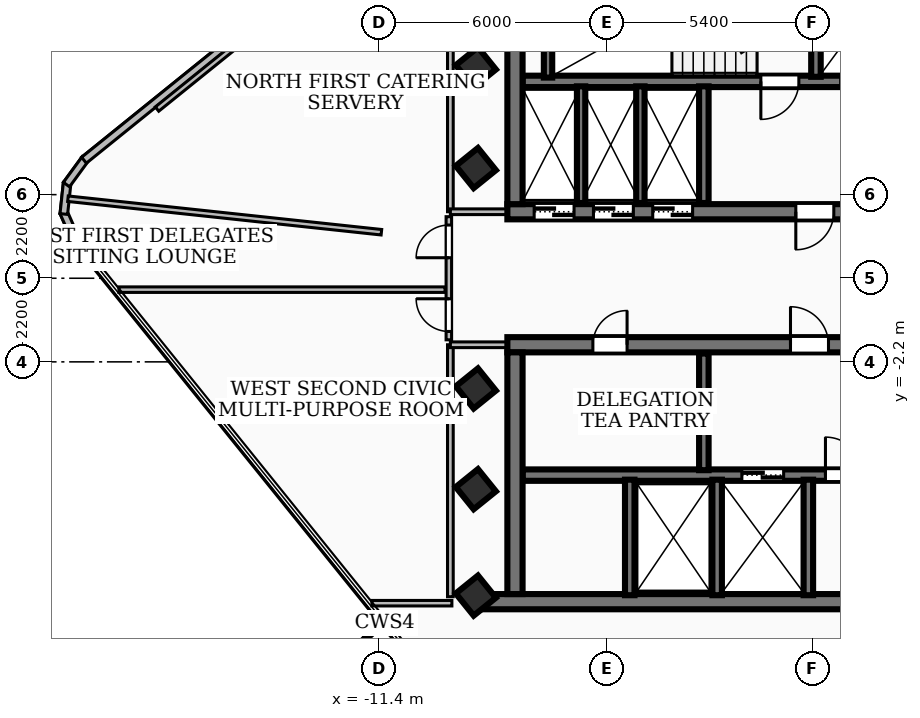
"""IFC4 building model, lengths in metres.
Left out: names, types, materials, properties, quantities, classifications, styles, units other than length and angle.
Written with IfcOpenShell. Run it as: python <this file> out.ifc"""

import sys

from ifc_helpers import new_model, si_unit, direction, frame, frame_2d, origin, origin_2d, place, context, subcontext, project, spatial, rectangle, extrude, element, fill, save


model = new_model("IFC4")
c1 = context("Model", 3, precision=1e-05, world=origin(), true_north=direction((0.0, 1.0)))
c2 = subcontext(c1, "Body", "Model", "MODEL_VIEW")
j1 = project(units=[si_unit("LENGTHUNIT", "METRE"), si_unit("PLANEANGLEUNIT", "RADIAN")], contexts=[c1])
p1 = place(None, origin())
s1 = spatial("IfcSite", under=j1, at=p1, CompositionType="ELEMENT")
p2 = place(p1, origin())
s2 = spatial("IfcBuilding", under=s1, at=p2, CompositionType="ELEMENT")
p3 = place(p2, frame((0.0, 0.0, 235.98)))
s3 = spatial("IfcBuildingStorey", under=s2, at=p3, CompositionType="ELEMENT", Elevation=235.98)
p4 = place(p3, frame((8.02, 1.75, 0.0), z_axis=(0.0, 0.0, 1.0), x_axis=(-1.0, 0.0, 0.0)))
e1 = element("IfcWall", 1, at=p4, inside=s3, PredefinedType="SHEAR", context=c2, shape_type="SweptSolid", body=[
    extrude(rectangle(XDim=16.04, YDim=0.4, at=frame_2d((8.02, 0.0))), origin(), (0.0, 0.0, 1.0), 3.02),
])
p5 = place(p4, frame((7.45, 0.0, 0.0)))
e2 = element("IfcOpeningElement", 2, at=p5, cuts=e1, PredefinedType="OPENING", context=c2, shape_type="SweptSolid", body=[
    extrude(rectangle(XDim=1.0, YDim=2.1, at=frame_2d((0.5, 1.05))), frame((0.0, 0.21, 0.0), z_axis=(0.0, -1.0, 0.0), x_axis=(1.0, 0.0, 0.0)), (0.0, 0.0, 1.0), 0.42),
])
p6 = place(p4, frame((14.285, 0.0, 0.0)))
e3 = element("IfcOpeningElement", 3, at=p6, cuts=e1, PredefinedType="OPENING", context=c2, shape_type="SweptSolid", body=[
    extrude(rectangle(XDim=1.05, YDim=2.15, at=frame_2d((0.525, 1.075))), frame((0.0, 0.21, 0.0), z_axis=(0.0, -1.0, 0.0), x_axis=(1.0, 0.0, 0.0)), (0.0, 0.0, 1.0), 0.42),
])
p7 = place(p4, frame((12.725, 0.0, 0.0)))
e4 = element("IfcOpeningElement", 4, at=p7, cuts=e1, PredefinedType="OPENING", context=c2, shape_type="SweptSolid", body=[
    extrude(rectangle(XDim=1.05, YDim=2.15, at=frame_2d((0.525, 1.075))), frame((0.0, 0.21, 0.0), z_axis=(0.0, -1.0, 0.0), x_axis=(1.0, 0.0, 0.0)), (0.0, 0.0, 1.0), 0.42),
])
p8 = place(p4, frame((11.165, 0.0, 0.0)))
e5 = element("IfcOpeningElement", 5, at=p8, cuts=e1, PredefinedType="OPENING", context=c2, shape_type="SweptSolid", body=[
    extrude(rectangle(XDim=1.05, YDim=2.15, at=frame_2d((0.525, 1.075))), frame((0.0, 0.21, 0.0), z_axis=(0.0, -1.0, 0.0), x_axis=(1.0, 0.0, 0.0)), (0.0, 0.0, 1.0), 0.42),
])
p9 = place(p4, frame((3.4, 0.0, 0.0)))
e6 = element("IfcOpeningElement", 6, at=p9, cuts=e1, PredefinedType="OPENING", context=c2, shape_type="SweptSolid", body=[
    extrude(rectangle(XDim=0.9, YDim=2.06, at=frame_2d((0.45, 1.03))), frame((0.0, 0.21, 0.0), z_axis=(0.0, -1.0, 0.0), x_axis=(1.0, 0.0, 0.0)), (0.0, 0.0, 1.0), 0.42),
])
p10 = place(p4, frame((1.1, 0.0, 0.0)))
e7 = element("IfcOpeningElement", 7, at=p10, cuts=e1, PredefinedType="OPENING", context=c2, shape_type="SweptSolid", body=[
    extrude(rectangle(XDim=0.9, YDim=2.06, at=frame_2d((0.45, 1.03))), frame((0.0, 0.21, 0.0), z_axis=(0.0, -1.0, 0.0), x_axis=(1.0, 0.0, 0.0)), (0.0, 0.0, 1.0), 0.42),
])
p11 = place(p3, frame((-7.82, 1.95, 0.0), z_axis=(0.0, 0.0, 1.0), x_axis=(0.0, 1.0, 0.0)))
e8 = element("IfcWall", 8, at=p11, inside=s3, PredefinedType="SHEAR", context=c2, shape_type="SweptSolid", body=[
    extrude(rectangle(XDim=6.36, YDim=0.4, at=frame_2d((3.18, 0.0))), origin(), (0.0, 0.0, 1.0), 3.02),
])
p12 = place(p3, frame((7.62, 5.18, 0.0), z_axis=(0.0, 0.0, 1.0), x_axis=(-1.0, 0.0, 0.0)))
e9 = element("IfcWall", 9, at=p12, inside=s3, PredefinedType="SOLIDWALL", context=c2, shape_type="SweptSolid", body=[
    extrude(rectangle(XDim=15.24, YDim=0.3, at=frame_2d((7.62, 0.0))), origin(), (0.0, 0.0, 1.0), 3.02),
])
p13 = place(p12, frame((5.77, 0.0, 0.0)))
e10 = element("IfcOpeningElement", 10, at=p13, cuts=e9, PredefinedType="OPENING", context=c2, shape_type="SweptSolid", body=[
    extrude(rectangle(XDim=1.1, YDim=2.15, at=frame_2d((0.55, 1.075))), frame((0.0, 0.16, 0.0), z_axis=(0.0, -1.0, 0.0), x_axis=(1.0, 0.0, 0.0)), (0.0, 0.0, 1.0), 0.32),
])
p14 = place(p12, frame((2.97, 0.0, 0.0)))
e11 = element("IfcOpeningElement", 11, at=p14, cuts=e9, PredefinedType="OPENING", context=c2, shape_type="SweptSolid", body=[
    extrude(rectangle(XDim=1.1, YDim=2.15, at=frame_2d((0.55, 1.075))), frame((0.0, 0.16, 0.0), z_axis=(0.0, -1.0, 0.0), x_axis=(1.0, 0.0, 0.0)), (0.0, 0.0, 1.0), 0.32),
])
p15 = place(p12, frame((7.97, 0.0, 0.0)))
e12 = element("IfcOpeningElement", 12, at=p15, cuts=e9, PredefinedType="OPENING", context=c2, shape_type="SweptSolid", body=[
    extrude(rectangle(XDim=1.0, YDim=2.1, at=frame_2d((0.5, 1.05))), frame((0.0, 0.16, 0.0), z_axis=(0.0, -1.0, 0.0), x_axis=(1.0, 0.0, 0.0)), (0.0, 0.0, 1.0), 0.32),
])
p16 = place(p3, frame((8.78, -8.51, 0.0), z_axis=(0.0, 0.0, 1.0), x_axis=(-1.0, 0.0, 0.0)))
e13 = element("IfcWall", 13, at=p16, inside=s3, PredefinedType="SHEAR", context=c2, shape_type="SweptSolid", body=[
    extrude(rectangle(XDim=17.56, YDim=0.4, at=frame_2d((8.78, 0.0))), origin(), (0.0, 0.0, 1.0), 3.02),
])
p17 = place(p3, frame((-8.02, -1.75, 0.0), z_axis=(0.0, 0.0, 1.0), x_axis=(1.0, 0.0, 0.0)))
e14 = element("IfcWall", 14, at=p17, inside=s3, PredefinedType="SHEAR", context=c2, shape_type="SweptSolid", body=[
    extrude(rectangle(XDim=16.04, YDim=0.4, at=frame_2d((8.02, 0.0))), origin(), (0.0, 0.0, 1.0), 3.02),
])
p18 = place(p17, frame((7.45, 0.0, 0.0)))
e15 = element("IfcOpeningElement", 15, at=p18, cuts=e14, PredefinedType="OPENING", context=c2, shape_type="SweptSolid", body=[
    extrude(rectangle(XDim=1.0, YDim=2.1, at=frame_2d((0.5, 1.05))), frame((0.0, 0.21, 0.0), z_axis=(0.0, -1.0, 0.0), x_axis=(1.0, 0.0, 0.0)), (0.0, 0.0, 1.0), 0.42),
])
p19 = place(p17, frame((12.65, 0.0, 0.0)))
e16 = element("IfcOpeningElement", 16, at=p19, cuts=e14, PredefinedType="OPENING", context=c2, shape_type="SweptSolid", body=[
    extrude(rectangle(XDim=0.9, YDim=2.06, at=frame_2d((0.45, 1.03))), frame((0.0, 0.21, 0.0), z_axis=(0.0, -1.0, 0.0), x_axis=(1.0, 0.0, 0.0)), (0.0, 0.0, 1.0), 0.42),
])
p20 = place(p17, frame((2.25, 0.0, 0.0)))
e17 = element("IfcOpeningElement", 17, at=p20, cuts=e14, PredefinedType="OPENING", context=c2, shape_type="SweptSolid", body=[
    extrude(rectangle(XDim=0.9, YDim=2.06, at=frame_2d((0.45, 1.03))), frame((0.0, 0.21, 0.0), z_axis=(0.0, -1.0, 0.0), x_axis=(1.0, 0.0, 0.0)), (0.0, 0.0, 1.0), 0.42),
])
p21 = place(p3, frame((-7.82, -8.31, 0.0), z_axis=(0.0, 0.0, 1.0), x_axis=(0.0, 1.0, 0.0)))
e18 = element("IfcWall", 18, at=p21, inside=s3, PredefinedType="SHEAR", context=c2, shape_type="SweptSolid", body=[
    extrude(rectangle(XDim=6.36, YDim=0.4, at=frame_2d((3.18, 0.0))), origin(), (0.0, 0.0, 1.0), 3.02),
])
p22 = place(p3, frame((-7.62, -5.18, 0.0), z_axis=(0.0, 0.0, 1.0), x_axis=(1.0, 0.0, 0.0)))
e19 = element("IfcWall", 19, at=p22, inside=s3, PredefinedType="SOLIDWALL", context=c2, shape_type="SweptSolid", body=[
    extrude(rectangle(XDim=15.24, YDim=0.3, at=frame_2d((7.62, 0.0))), origin(), (0.0, 0.0, 1.0), 3.02),
])
p23 = place(p22, frame((5.77, 0.0, 0.0)))
e20 = element("IfcOpeningElement", 20, at=p23, cuts=e19, PredefinedType="OPENING", context=c2, shape_type="SweptSolid", body=[
    extrude(rectangle(XDim=1.1, YDim=2.15, at=frame_2d((0.55, 1.075))), frame((0.0, 0.16, 0.0), z_axis=(0.0, -1.0, 0.0), x_axis=(1.0, 0.0, 0.0)), (0.0, 0.0, 1.0), 0.32),
])
p24 = place(p22, frame((7.97, 0.0, 0.0)))
e21 = element("IfcOpeningElement", 21, at=p24, cuts=e19, PredefinedType="OPENING", context=c2, shape_type="SweptSolid", body=[
    extrude(rectangle(XDim=1.0, YDim=2.1, at=frame_2d((0.5, 1.05))), frame((0.0, 0.16, 0.0), z_axis=(0.0, -1.0, 0.0), x_axis=(1.0, 0.0, 0.0)), (0.0, 0.0, 1.0), 0.32),
])
p25 = place(p3, frame((-6.95, 5.28, 0.0), z_axis=(0.0, 0.0, 1.0), x_axis=(0.0, 1.0, 0.0)))
e22 = element("IfcWall", 22, at=p25, inside=s3, PredefinedType="SOLIDWALL", context=c2, shape_type="SweptSolid", body=[
    extrude(rectangle(XDim=3.06, YDim=0.22, at=frame_2d((1.53, 0.0))), origin(), (0.0, 0.0, 1.0), 3.02),
])
p26 = place(p3, frame((0.1, 5.3, 0.0), z_axis=(0.0, 0.0, 1.0), x_axis=(0.0, 1.0, 0.0)))
e23 = element("IfcWall", 23, at=p26, inside=s3, PredefinedType="SOLIDWALL", context=c2, shape_type="SweptSolid", body=[
    extrude(rectangle(XDim=3.04, YDim=0.25, at=frame_2d((1.52, 0.0))), origin(), (0.0, 0.0, 1.0), 3.02),
])
p27 = place(p3, frame((-2.85, 1.98, 0.0), z_axis=(0.0, 0.0, 1.0), x_axis=(0.0, 1.0, 0.0)))
e24 = element("IfcWall", 24, at=p27, inside=s3, PredefinedType="SOLIDWALL", context=c2, shape_type="SweptSolid", body=[
    extrude(rectangle(XDim=3.07, YDim=0.25, at=frame_2d((1.535, 0.0))), origin(), (0.0, 0.0, 1.0), 3.02),
])
for number, where, z_axis, x_axis in (
    (25, (-0.1, -8.34, 0.0), (0.0, 0.0, 1.0), (0.0, 1.0, 0.0)),
    (26, (-2.5, -8.34, 0.0), (0.0, 0.0, 1.0), (0.0, 1.0, 0.0)),
    (27, (-4.8, -8.34, 0.0), (0.0, 0.0, 1.0), (0.0, 1.0, 0.0)),
):
    element("IfcWall", number, at=place(p3, frame(where, z_axis=z_axis, x_axis=x_axis)), inside=s3, PredefinedType="SOLIDWALL", context=c2, shape_type="SweptSolid", body=[
        extrude(rectangle(XDim=3.04, YDim=0.25, at=frame_2d((1.52, 0.0))), origin(), (0.0, 0.0, 1.0), 3.02),
    ])
p28 = place(p3, frame((-2.85, -5.05, 0.0), z_axis=(0.0, 0.0, 1.0), x_axis=(0.0, 1.0, 0.0)))
e28 = element("IfcWall", 28, at=p28, inside=s3, PredefinedType="SOLIDWALL", context=c2, shape_type="SweptSolid", body=[
    extrude(rectangle(XDim=3.07, YDim=0.25, at=frame_2d((1.535, 0.0))), origin(), (0.0, 0.0, 1.0), 3.02),
])
for number, where, z_axis, x_axis in (
    (29, (-6.08, 1.98, 0.0), (0.0, 0.0, 1.0), (0.0, 1.0, 0.0)),
    (30, (-4.52, 1.98, 0.0), (0.0, 0.0, 1.0), (0.0, 1.0, 0.0)),
):
    element("IfcWall", number, at=place(p3, frame(where, z_axis=z_axis, x_axis=x_axis)), inside=s3, PredefinedType="SOLIDWALL", context=c2, shape_type="SweptSolid", body=[
        extrude(rectangle(XDim=3.07, YDim=0.22, at=frame_2d((1.535, 0.0))), origin(), (0.0, 0.0, 1.0), 3.02),
    ])
for number, where, z_axis, x_axis in (
    (31, (-8.85, -5.55, 0.0), (0.0, 0.0, 1.0), (0.778, 0.628, 0.0)),
    (32, (-8.85, -2.9, 0.0), (0.0, 0.0, 1.0), (0.778, 0.628, 0.0)),
    (33, (-8.85, 2.9, 0.0), (0.0, 0.0, 1.0), (0.778, 0.628, 0.0)),
    (34, (-8.85, 5.55, 0.0), (0.0, 0.0, 1.0), (0.778, 0.628, 0.0)),
    (35, (-8.85, -8.35, 0.0), (0.0, 0.0, 1.0), (0.778, 0.628, 0.0)),
):
    element("IfcColumn", number, at=place(p3, frame(where, z_axis=z_axis, x_axis=x_axis)), inside=s3, PredefinedType="COLUMN", context=c2, shape_type="SweptSolid", body=[
        extrude(rectangle(XDim=0.75, YDim=0.75, at=origin_2d()), origin(), (0.0, 0.0, 1.0), 3.42),
    ])
p29 = place(p3, frame((-19.359, 0.971, 0.0), z_axis=(0.0, 0.0, 1.0), x_axis=(-0.405301422885, 0.914183108905, 0.0)))
e36 = element("IfcWall", 36, at=p29, inside=s3, PredefinedType="SOLIDWALL", context=c2, shape_type="SweptSolid", body=[
    extrude(rectangle(XDim=0.839, YDim=0.2, at=frame_2d((0.419, 0.0))), origin(), (0.0, 0.0, 1.0), 3.02),
])
p30 = place(p3, frame((-19.692, 1.69, 0.0), z_axis=(0.0, 0.0, 1.0), x_axis=(0.10656447925, 0.994305793889, 0.0)))
e37 = element("IfcWall", 37, at=p30, inside=s3, PredefinedType="SOLIDWALL", context=c2, shape_type="SweptSolid", body=[
    extrude(rectangle(XDim=0.825, YDim=0.2, at=frame_2d((0.412, 0.0))), origin(), (0.0, 0.0, 1.0), 3.02),
])
p31 = place(p3, frame((-19.622, 2.465, 0.0), z_axis=(0.0, 0.0, 1.0), x_axis=(0.590315771763, 0.807172403894, 0.0)))
e38 = element("IfcWall", 38, at=p31, inside=s3, PredefinedType="SOLIDWALL", context=c2, shape_type="SweptSolid", body=[
    extrude(rectangle(XDim=0.839, YDim=0.2, at=frame_2d((0.419, 0.0))), origin(), (0.0, 0.0, 1.0), 3.02),
])
p32 = place(p3, frame((-19.161, 3.106, 0.0), z_axis=(0.0, 0.0, 1.0), x_axis=(0.778151520732, 0.62807659627, 0.0)))
e39 = element("IfcWall", 39, at=p32, inside=s3, PredefinedType="SOLIDWALL", context=c2, shape_type="SweptSolid", body=[
    extrude(rectangle(XDim=6.741, YDim=0.2, at=frame_2d((3.371, 0.0))), origin(), (0.0, 0.0, 1.0), 3.02),
])
p33 = place(p3, frame((-9.52, 1.75, 0.0), z_axis=(0.0, 0.0, 1.0), x_axis=(0.0, 1.0, 0.0)))
e40 = element("IfcWall", 40, at=p33, inside=s3, PredefinedType="PARTITIONING", context=c2, shape_type="SweptSolid", body=[
    extrude(rectangle(XDim=6.63, YDim=0.15, at=frame_2d((3.315, 0.0))), origin(), (0.0, 0.0, 1.0), 1.904),
])
p34 = place(p3, frame((-7.85, 1.75, 0.0), z_axis=(0.0, 0.0, 1.0), x_axis=(-1.0, 0.0, 0.0)))
e41 = element("IfcWall", 41, at=p34, inside=s3, PredefinedType="PARTITIONING", context=c2, shape_type="SweptSolid", body=[
    extrude(rectangle(XDim=1.67, YDim=0.15, at=frame_2d((0.835, 0.0))), origin(), (0.0, 0.0, 1.0), 1.15),
])
p35 = place(p3, frame((-9.52, -8.38, 0.0), z_axis=(0.0, 0.0, 1.0), x_axis=(0.0, 1.0, 0.0)))
e42 = element("IfcWall", 42, at=p35, inside=s3, PredefinedType="PARTITIONING", context=c2, shape_type="SweptSolid", body=[
    extrude(rectangle(XDim=6.63, YDim=0.15, at=frame_2d((3.315, 0.0))), origin(), (0.0, 0.0, 1.0), 1.904),
])
p36 = place(p3, frame((-7.85, -1.75, 0.0), z_axis=(0.0, 0.0, 1.0), x_axis=(-1.0, 0.0, 0.0)))
e43 = element("IfcWall", 43, at=p36, inside=s3, PredefinedType="PARTITIONING", context=c2, shape_type="SweptSolid", body=[
    extrude(rectangle(XDim=1.67, YDim=0.15, at=frame_2d((0.835, 0.0))), origin(), (0.0, 0.0, 1.0), 1.15),
])
p37 = place(p3, frame((-18.242, -0.3, 0.0), z_axis=(0.0, 0.0, 1.0), x_axis=(1.0, 0.0, 0.0)))
e44 = element("IfcWall", 44, at=p37, inside=s3, PredefinedType="PARTITIONING", context=c2, shape_type="SweptSolid", body=[
    extrude(rectangle(XDim=8.582, YDim=0.145, at=frame_2d((4.291, 0.0))), origin(), (0.0, 0.0, 1.0), 1.15),
])
p38 = place(p3, frame((-11.585, -8.55, 0.0), z_axis=(0.0, 0.0, 1.0), x_axis=(1.0, 0.0, 0.0)))
e45 = element("IfcWall", 45, at=p38, inside=s3, PredefinedType="PARTITIONING", context=c2, shape_type="SweptSolid", body=[
    extrude(rectangle(XDim=2.105, YDim=0.145, at=frame_2d((1.052, 0.0))), origin(), (0.0, 0.0, 1.0), 3.02),
])
p39 = place(p3, frame((-9.56, -1.62, 0.0), z_axis=(0.0, 0.0, 1.0), x_axis=(0.0, 1.0, 0.0)))
e46 = element("IfcWall", 46, at=p39, inside=s3, PredefinedType="PARTITIONING", context=c2, shape_type="SweptSolid", body=[
    extrude(rectangle(XDim=3.24, YDim=0.145, at=frame_2d((1.62, 0.0))), origin(), (0.0, 0.0, 1.0), 3.02),
])
p40 = place(p39, frame((0.22, 0.0, 0.0)))
e47 = element("IfcOpeningElement", 47, at=p40, cuts=e46, PredefinedType="OPENING", context=c2, shape_type="SweptSolid", body=[
    extrude(rectangle(XDim=0.86, YDim=2.04, at=frame_2d((0.43, 1.02))), frame((0.0, 0.083, 0.0), z_axis=(0.0, -1.0, 0.0), x_axis=(1.0, 0.0, 0.0)), (0.0, 0.0, 1.0), 0.165),
])
p41 = place(p39, frame((2.16, 0.0, 0.0)))
e48 = element("IfcOpeningElement", 48, at=p41, cuts=e46, PredefinedType="OPENING", context=c2, shape_type="SweptSolid", body=[
    extrude(rectangle(XDim=0.86, YDim=2.04, at=frame_2d((0.43, 1.02))), frame((0.0, 0.083, 0.0), z_axis=(0.0, -1.0, 0.0), x_axis=(1.0, 0.0, 0.0)), (0.0, 0.0, 1.0), 0.165),
])
p42 = place(p3, frame((-11.335, 1.211, 0.0), z_axis=(0.0, 0.0, 1.0), x_axis=(-0.994330067434, 0.106337749634, 0.0)))
e49 = element("IfcWall", 49, at=p42, inside=s3, PredefinedType="PARTITIONING", context=c2, shape_type="SweptSolid", body=[
    extrude(rectangle(XDim=8.295, YDim=0.145, at=frame_2d((4.147, 0.0))), origin(), (0.0, 0.0, 1.0), 1.15),
])
p43 = place(p3, frame((-17.239, 4.452, 0.0), z_axis=(0.0, 0.0, 1.0), x_axis=(0.778262183237, 0.627939466942, 0.0)))
e50 = element("IfcWall", 50, at=p43, inside=s3, PredefinedType="PARTITIONING", context=c2, shape_type="SweptSolid", body=[
    extrude(rectangle(XDim=20.641, YDim=0.145, at=frame_2d((10.32, 0.0))), origin(), (0.0, 0.0, 1.0), 2.39),
])
p44 = place(p43, frame((10.02, 0.0, 0.0)))
e51 = element("IfcOpeningElement", 51, at=p44, cuts=e50, PredefinedType="OPENING", context=c2, shape_type="SweptSolid", body=[
    extrude(rectangle(XDim=1.2, YDim=2.1, at=frame_2d((0.6, 1.05))), frame((0.0, 0.083, 0.0), z_axis=(0.0, -1.0, 0.0), x_axis=(1.0, 0.0, 0.0)), (0.0, 0.0, 1.0), 0.165),
])
p45 = place(p5, origin())
e52 = element("IfcDoor", 52, at=p45, inside=s3, OperationType="SINGLE_SWING_RIGHT", PredefinedType="DOOR", context=c2, shape_type="SweptSolid", body=[
    extrude(rectangle(XDim=1.0, YDim=2.1, at=frame_2d((0.5, 1.05))), frame((0.0, 0.025, 0.0), z_axis=(0.0, -1.0, 0.0), x_axis=(1.0, 0.0, 0.0)), (0.0, 0.0, 1.0), 0.05),
])
fill(e2, e52)
p46 = place(p18, origin())
e53 = element("IfcDoor", 53, at=p46, inside=s3, OperationType="SINGLE_SWING_LEFT", PredefinedType="DOOR", context=c2, shape_type="SweptSolid", body=[
    extrude(rectangle(XDim=1.0, YDim=2.1, at=frame_2d((0.5, 1.05))), frame((0.0, 0.025, 0.0), z_axis=(0.0, -1.0, 0.0), x_axis=(1.0, 0.0, 0.0)), (0.0, 0.0, 1.0), 0.05),
])
fill(e15, e53)
p47 = place(p15, origin())
e54 = element("IfcDoor", 54, at=p47, inside=s3, OperationType="SINGLE_SWING_RIGHT", PredefinedType="DOOR", context=c2, shape_type="SweptSolid", body=[
    extrude(rectangle(XDim=1.0, YDim=2.1, at=frame_2d((0.5, 1.05))), frame((0.0, 0.025, 0.0), z_axis=(0.0, -1.0, 0.0), x_axis=(1.0, 0.0, 0.0)), (0.0, 0.0, 1.0), 0.05),
])
fill(e12, e54)
p48 = place(p23, origin())
e55 = element("IfcDoor", 55, at=p48, inside=s3, OperationType="DOUBLE_DOOR_SLIDING", PredefinedType="DOOR", context=c2, shape_type="SweptSolid", body=[
    extrude(rectangle(XDim=1.1, YDim=2.15, at=frame_2d((0.55, 1.075))), frame((0.0, 0.025, 0.0), z_axis=(0.0, -1.0, 0.0), x_axis=(1.0, 0.0, 0.0)), (0.0, 0.0, 1.0), 0.05),
])
fill(e20, e55)
p49 = place(p24, origin())
e56 = element("IfcDoor", 56, at=p49, inside=s3, OperationType="SINGLE_SWING_LEFT", PredefinedType="DOOR", context=c2, shape_type="SweptSolid", body=[
    extrude(rectangle(XDim=1.0, YDim=2.1, at=frame_2d((0.5, 1.05))), frame((0.0, 0.025, 0.0), z_axis=(0.0, -1.0, 0.0), x_axis=(1.0, 0.0, 0.0)), (0.0, 0.0, 1.0), 0.05),
])
fill(e21, e56)
p50 = place(p6, origin())
e57 = element("IfcDoor", 57, at=p50, inside=s3, OperationType="DOUBLE_DOOR_SLIDING", PredefinedType="DOOR", context=c2, shape_type="SweptSolid", body=[
    extrude(rectangle(XDim=1.05, YDim=2.15, at=frame_2d((0.525, 1.075))), frame((0.0, 0.025, 0.0), z_axis=(0.0, -1.0, 0.0), x_axis=(1.0, 0.0, 0.0)), (0.0, 0.0, 1.0), 0.05),
])
fill(e3, e57)
p51 = place(p7, origin())
e58 = element("IfcDoor", 58, at=p51, inside=s3, OperationType="DOUBLE_DOOR_SLIDING", PredefinedType="DOOR", context=c2, shape_type="SweptSolid", body=[
    extrude(rectangle(XDim=1.05, YDim=2.15, at=frame_2d((0.525, 1.075))), frame((0.0, 0.025, 0.0), z_axis=(0.0, -1.0, 0.0), x_axis=(1.0, 0.0, 0.0)), (0.0, 0.0, 1.0), 0.05),
])
fill(e4, e58)
p52 = place(p8, origin())
e59 = element("IfcDoor", 59, at=p52, inside=s3, OperationType="DOUBLE_DOOR_SLIDING", PredefinedType="DOOR", context=c2, shape_type="SweptSolid", body=[
    extrude(rectangle(XDim=1.05, YDim=2.15, at=frame_2d((0.525, 1.075))), frame((0.0, 0.025, 0.0), z_axis=(0.0, -1.0, 0.0), x_axis=(1.0, 0.0, 0.0)), (0.0, 0.0, 1.0), 0.05),
])
fill(e5, e59)
p53 = place(p20, origin())
e60 = element("IfcDoor", 60, at=p53, inside=s3, OperationType="SINGLE_SWING_RIGHT", PredefinedType="DOOR", context=c2, shape_type="SweptSolid", body=[
    extrude(rectangle(XDim=0.9, YDim=2.06, at=frame_2d((0.45, 1.03))), frame((0.0, 0.025, 0.0), z_axis=(0.0, -1.0, 0.0), x_axis=(1.0, 0.0, 0.0)), (0.0, 0.0, 1.0), 0.05),
])
fill(e17, e60)
p54 = place(p40, origin())
e61 = element("IfcDoor", 61, at=p54, inside=s3, OperationType="SINGLE_SWING_RIGHT", PredefinedType="DOOR", context=c2, shape_type="SweptSolid", body=[
    extrude(rectangle(XDim=0.86, YDim=2.04, at=frame_2d((0.43, 1.02))), frame((0.0, 0.025, 0.0), z_axis=(0.0, -1.0, 0.0), x_axis=(1.0, 0.0, 0.0)), (0.0, 0.0, 1.0), 0.05),
])
fill(e47, e61)
p55 = place(p41, origin())
e62 = element("IfcDoor", 62, at=p55, inside=s3, OperationType="SINGLE_SWING_LEFT", PredefinedType="DOOR", context=c2, shape_type="SweptSolid", body=[
    extrude(rectangle(XDim=0.86, YDim=2.04, at=frame_2d((0.43, 1.02))), frame((0.0, 0.025, 0.0), z_axis=(0.0, -1.0, 0.0), x_axis=(1.0, 0.0, 0.0)), (0.0, 0.0, 1.0), 0.05),
])
fill(e48, e62)
save(model, sys.argv[1])
